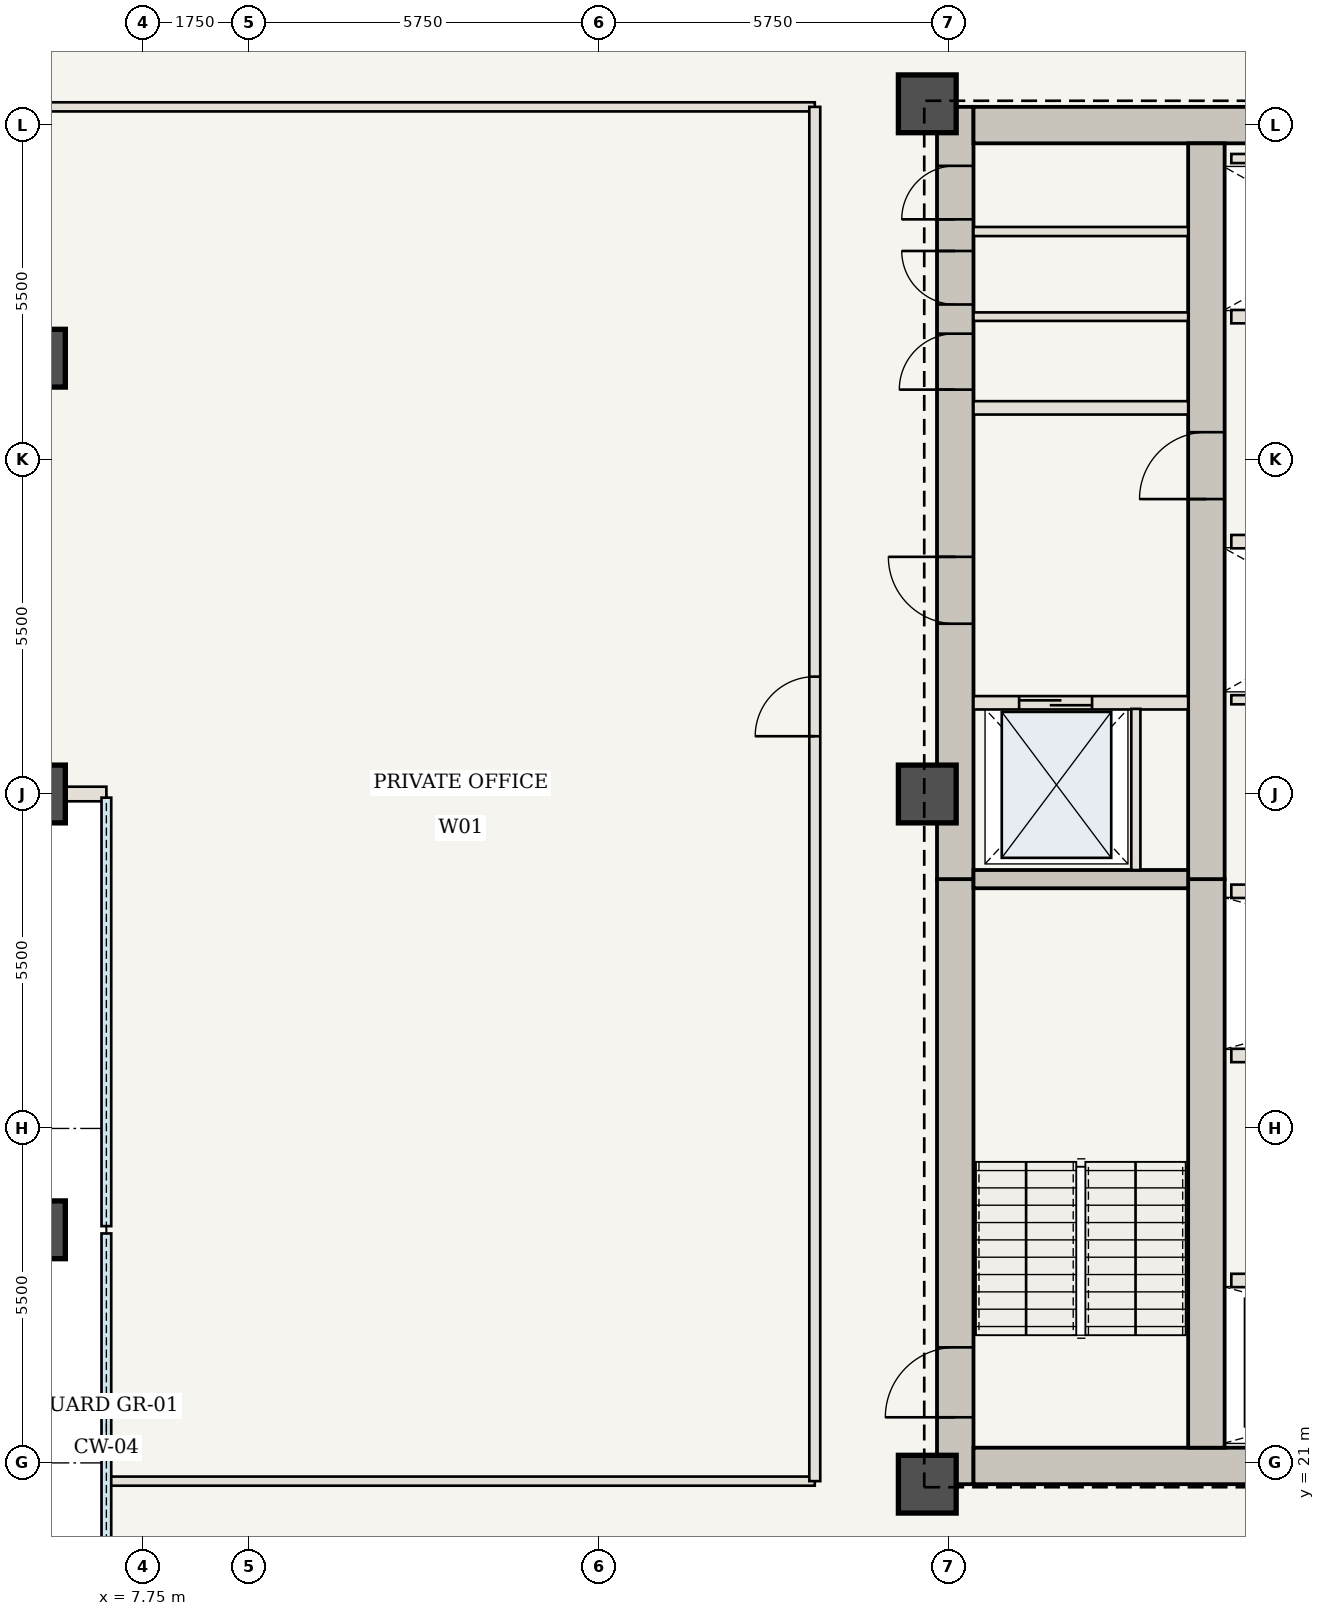
"""IFC4 building model, lengths in metres.
Left out: names, types, materials, properties, quantities, classifications, styles, units other than length and angle.
Written with IfcOpenShell. Run it as: python <this file> out.ifc"""

import sys

from ifc_helpers import new_model, si_unit, direction, frame, frame_2d, origin, origin_2d, place, context, subcontext, project, spatial, rectangle, extrude, element, fill, save


model = new_model("IFC4")
c1 = context("Model", 3, precision=1e-05, world=origin(), true_north=direction((0.0, 1.0)))
c2 = subcontext(c1, "Body", "Model", "MODEL_VIEW")
j1 = project(units=[si_unit("LENGTHUNIT", "METRE"), si_unit("PLANEANGLEUNIT", "RADIAN")], contexts=[c1])
p1 = place(None, origin())
s1 = spatial("IfcSite", under=j1, at=p1, CompositionType="ELEMENT")
p2 = place(p1, origin())
s2 = spatial("IfcBuilding", under=s1, at=p2, CompositionType="ELEMENT")
p3 = place(p2, frame((0.0, 0.0, 164.5)))
s3 = spatial("IfcBuildingStorey", under=s2, at=p3, CompositionType="ELEMENT", Elevation=164.5)
p4 = place(p3, frame((21.11, 20.65, 0.0), z_axis=(0.0, 0.0, 1.0), x_axis=(0.0, 1.0, 0.0)))
e1 = element("IfcWall", 1, at=p4, inside=s3, PredefinedType="SHEAR", context=c2, shape_type="SweptSolid", body=[
    extrude(rectangle(XDim=9.95, YDim=0.6, at=frame_2d((4.975, 0.0))), origin(), (0.0, 0.0, 1.0), 3.85),
])
p5 = place(p4, frame((1.1, 0.0, 0.0)))
e2 = element("IfcOpeningElement", 2, at=p5, cuts=e1, PredefinedType="OPENING", context=c2, shape_type="SweptSolid", body=[
    extrude(rectangle(XDim=1.15, YDim=2.15, at=frame_2d((0.575, 1.075))), frame((0.0, 0.31, 0.0), z_axis=(0.0, -1.0, 0.0), x_axis=(1.0, 0.0, 0.0)), (0.0, 0.0, 1.0), 0.62),
])
p6 = place(p3, frame((21.11, 30.6, 0.0), z_axis=(0.0, 0.0, 1.0), x_axis=(0.0, 1.0, 0.0)))
e3 = element("IfcWall", 3, at=p6, inside=s3, PredefinedType="SHEAR", context=c2, shape_type="SweptSolid", body=[
    extrude(rectangle(XDim=12.7, YDim=0.6, at=frame_2d((6.35, 0.0))), origin(), (0.0, 0.0, 1.0), 3.85),
])
p7 = place(p6, frame((4.2, 0.0, 0.0)))
e4 = element("IfcOpeningElement", 4, at=p7, cuts=e3, PredefinedType="OPENING", context=c2, shape_type="SweptSolid", body=[
    extrude(rectangle(XDim=1.1, YDim=2.15, at=frame_2d((0.55, 1.075))), frame((0.0, 0.31, 0.0), z_axis=(0.0, -1.0, 0.0), x_axis=(1.0, 0.0, 0.0)), (0.0, 0.0, 1.0), 0.62),
])
p8 = place(p6, frame((8.05, 0.0, 0.0)))
e5 = element("IfcOpeningElement", 5, at=p8, cuts=e3, PredefinedType="OPENING", context=c2, shape_type="SweptSolid", body=[
    extrude(rectangle(XDim=0.92, YDim=2.1, at=frame_2d((0.46, 1.05))), frame((0.0, 0.31, 0.0), z_axis=(0.0, -1.0, 0.0), x_axis=(1.0, 0.0, 0.0)), (0.0, 0.0, 1.0), 0.62),
])
p9 = place(p6, frame((9.45, 0.0, 0.0)))
e6 = element("IfcOpeningElement", 6, at=p9, cuts=e3, PredefinedType="OPENING", context=c2, shape_type="SweptSolid", body=[
    extrude(rectangle(XDim=0.88, YDim=2.1, at=frame_2d((0.44, 1.05))), frame((0.0, 0.31, 0.0), z_axis=(0.0, -1.0, 0.0), x_axis=(1.0, 0.0, 0.0)), (0.0, 0.0, 1.0), 0.62),
])
p10 = place(p6, frame((10.85, 0.0, 0.0)))
e7 = element("IfcOpeningElement", 7, at=p10, cuts=e3, PredefinedType="OPENING", context=c2, shape_type="SweptSolid", body=[
    extrude(rectangle(XDim=0.88, YDim=2.1, at=frame_2d((0.44, 1.05))), frame((0.0, 0.31, 0.0), z_axis=(0.0, -1.0, 0.0), x_axis=(1.0, 0.0, 0.0)), (0.0, 0.0, 1.0), 0.62),
])
p11 = place(p3, frame((21.41, 20.95, 0.0), z_axis=(0.0, 0.0, 1.0), x_axis=(1.0, 0.0, 0.0)))
e8 = element("IfcWall", 8, at=p11, inside=s3, PredefinedType="SHEAR", context=c2, shape_type="SweptSolid", body=[
    extrude(rectangle(XDim=13.74, YDim=0.6, at=frame_2d((6.87, 0.0))), origin(), (0.0, 0.0, 1.0), 3.85),
])
p12 = place(p3, frame((21.41, 43.0, 0.0), z_axis=(0.0, 0.0, 1.0), x_axis=(1.0, 0.0, 0.0)))
e9 = element("IfcWall", 9, at=p12, inside=s3, PredefinedType="SHEAR", context=c2, shape_type="SweptSolid", body=[
    extrude(rectangle(XDim=8.24, YDim=0.6, at=frame_2d((4.12, 0.0))), origin(), (0.0, 0.0, 1.0), 3.85),
])
p13 = place(p3, frame((25.24, 21.25, 0.0), z_axis=(0.0, 0.0, 1.0), x_axis=(0.0, 1.0, 0.0)))
e10 = element("IfcWall", 10, at=p13, inside=s3, PredefinedType="SHEAR", context=c2, shape_type="SweptSolid", body=[
    extrude(rectangle(XDim=9.35, YDim=0.6, at=frame_2d((4.675, 0.0))), origin(), (0.0, 0.0, 1.0), 3.85),
])
p14 = place(p3, frame((25.24, 30.6, 0.0), z_axis=(0.0, 0.0, 1.0), x_axis=(0.0, 1.0, 0.0)))
e11 = element("IfcWall", 11, at=p14, inside=s3, PredefinedType="SHEAR", context=c2, shape_type="SweptSolid", body=[
    extrude(rectangle(XDim=12.1, YDim=0.6, at=frame_2d((6.05, 0.0))), origin(), (0.0, 0.0, 1.0), 3.85),
])
p15 = place(p14, frame((6.25, 0.0, 0.0)))
e12 = element("IfcOpeningElement", 12, at=p15, cuts=e11, PredefinedType="OPENING", context=c2, shape_type="SweptSolid", body=[
    extrude(rectangle(XDim=1.1, YDim=2.15, at=frame_2d((0.55, 1.075))), frame((0.0, 0.31, 0.0), z_axis=(0.0, -1.0, 0.0), x_axis=(1.0, 0.0, 0.0)), (0.0, 0.0, 1.0), 0.62),
])
for number, where, z_axis, x_axis in (
    (13, (20.65, 20.65, 0.0), (0.0, 0.0, 1.0), (1.0, 0.0, 0.0)),
    (14, (20.65, 43.35, 0.0), (0.0, 0.0, 1.0), (1.0, 0.0, 0.0)),
    (15, (20.65, 32.0, 0.0), (0.0, 0.0, 1.0), (1.0, 0.0, 0.0)),
    (16, (6.0, 24.833, 0.0), (0.0, 0.0, 1.0), (1.0, 0.0, 0.0)),
    (17, (6.0, 32.0, 0.0), (0.0, 0.0, 1.0), (1.0, 0.0, 0.0)),
    (18, (6.0, 39.167, 0.0), (0.0, 0.0, 1.0), (1.0, 0.0, 0.0)),
):
    element("IfcColumn", number, at=place(p3, frame(where, z_axis=z_axis, x_axis=x_axis)), inside=s3, PredefinedType="COLUMN", context=c2, shape_type="SweptSolid", body=[
        extrude(rectangle(XDim=0.95, YDim=0.95, at=origin_2d()), origin(), (0.0, 0.0, 1.0), 3.85),
    ])
p16 = place(p3, frame((21.41, 30.6, 0.0), z_axis=(0.0, 0.0, 1.0), x_axis=(1.0, 0.0, 0.0)))
e19 = element("IfcWall", 19, at=p16, inside=s3, PredefinedType="SHEAR", context=c2, shape_type="SweptSolid", body=[
    extrude(rectangle(XDim=3.53, YDim=0.3, at=frame_2d((1.765, 0.0))), origin(), (0.0, 0.0, 1.0), 3.685),
])
p17 = place(p3, frame((21.41, 33.5, 0.0), z_axis=(0.0, 0.0, 1.0), x_axis=(1.0, 0.0, 0.0)))
e20 = element("IfcWall", 20, at=p17, inside=s3, PredefinedType="STANDARD", context=c2, shape_type="SweptSolid", body=[
    extrude(rectangle(XDim=3.53, YDim=0.22, at=frame_2d((1.765, 0.0))), origin(), (0.0, 0.0, 1.0), 3.685),
])
p18 = place(p17, frame((0.75, 0.0, 0.0)))
e21 = element("IfcOpeningElement", 21, at=p18, cuts=e20, PredefinedType="OPENING", context=c2, shape_type="SweptSolid", body=[
    extrude(rectangle(XDim=1.2, YDim=2.2, at=frame_2d((0.6, 1.1))), frame((0.0, 0.12, 0.0), z_axis=(0.0, -1.0, 0.0), x_axis=(1.0, 0.0, 0.0)), (0.0, 0.0, 1.0), 0.24),
])
p19 = place(p3, frame((24.08, 30.75, 0.0), z_axis=(0.0, 0.0, 1.0), x_axis=(0.0, 1.0, 0.0)))
e22 = element("IfcWall", 22, at=p19, inside=s3, PredefinedType="STANDARD", context=c2, shape_type="SweptSolid", body=[
    extrude(rectangle(XDim=2.65, YDim=0.15, at=frame_2d((1.325, 0.0))), origin(), (0.0, 0.0, 1.0), 3.685),
])
p20 = place(p3, frame((21.41, 38.35, 0.0), z_axis=(0.0, 0.0, 1.0), x_axis=(1.0, 0.0, 0.0)))
e23 = element("IfcWall", 23, at=p20, inside=s3, PredefinedType="STANDARD", context=c2, shape_type="SweptSolid", body=[
    extrude(rectangle(XDim=3.53, YDim=0.22, at=frame_2d((1.765, 0.0))), origin(), (0.0, 0.0, 1.0), 3.685),
])
p21 = place(p3, frame((21.41, 39.85, 0.0), z_axis=(0.0, 0.0, 1.0), x_axis=(1.0, 0.0, 0.0)))
e24 = element("IfcWall", 24, at=p21, inside=s3, PredefinedType="STANDARD", context=c2, shape_type="SweptSolid", body=[
    extrude(rectangle(XDim=3.53, YDim=0.14, at=frame_2d((1.765, 0.0))), origin(), (0.0, 0.0, 1.0), 3.685),
])
p22 = place(p3, frame((21.41, 41.25, 0.0), z_axis=(0.0, 0.0, 1.0), x_axis=(1.0, 0.0, 0.0)))
e25 = element("IfcWall", 25, at=p22, inside=s3, PredefinedType="STANDARD", context=c2, shape_type="SweptSolid", body=[
    extrude(rectangle(XDim=3.53, YDim=0.15, at=frame_2d((1.765, 0.0))), origin(), (0.0, 0.0, 1.0), 3.685),
])
p23 = place(p3, frame((25.65, 24.0, 0.0), z_axis=(0.0, 0.0, 1.0), x_axis=(1.0, 0.0, 0.0)))
e26 = element("IfcWall", 26, at=p23, inside=s3, PredefinedType="STANDARD", context=c2, shape_type="SweptSolid", body=[
    extrude(rectangle(XDim=9.25, YDim=0.22, at=frame_2d((4.625, 0.0))), origin(), (0.0, 0.0, 1.0), 3.685),
])
p24 = place(p23, frame((0.58, 0.0, 0.0)))
e27 = element("IfcOpeningElement", 27, at=p24, cuts=e26, PredefinedType="OPENING", context=c2, shape_type="SweptSolid", body=[
    extrude(rectangle(XDim=1.1, YDim=2.15, at=frame_2d((0.55, 1.075))), frame((0.0, 0.12, 0.0), z_axis=(0.0, -1.0, 0.0), x_axis=(1.0, 0.0, 0.0)), (0.0, 0.0, 1.0), 0.24),
])
p25 = place(p23, frame((2.75, 0.0, 0.0)))
e28 = element("IfcOpeningElement", 28, at=p25, cuts=e26, PredefinedType="OPENING", context=c2, shape_type="SweptSolid", body=[
    extrude(rectangle(XDim=1.1, YDim=2.15, at=frame_2d((0.55, 1.075))), frame((0.0, 0.12, 0.0), z_axis=(0.0, -1.0, 0.0), x_axis=(1.0, 0.0, 0.0)), (0.0, 0.0, 1.0), 0.24),
])
p26 = place(p23, frame((5.05, 0.0, 0.0)))
e29 = element("IfcOpeningElement", 29, at=p26, cuts=e26, PredefinedType="OPENING", context=c2, shape_type="SweptSolid", body=[
    extrude(rectangle(XDim=1.1, YDim=2.15, at=frame_2d((0.55, 1.075))), frame((0.0, 0.12, 0.0), z_axis=(0.0, -1.0, 0.0), x_axis=(1.0, 0.0, 0.0)), (0.0, 0.0, 1.0), 0.24),
])
p27 = place(p23, frame((7.35, 0.0, 0.0)))
e30 = element("IfcOpeningElement", 30, at=p27, cuts=e26, PredefinedType="OPENING", context=c2, shape_type="SweptSolid", body=[
    extrude(rectangle(XDim=1.1, YDim=2.15, at=frame_2d((0.55, 1.075))), frame((0.0, 0.12, 0.0), z_axis=(0.0, -1.0, 0.0), x_axis=(1.0, 0.0, 0.0)), (0.0, 0.0, 1.0), 0.24),
])
for number, where, z_axis, x_axis in (
    (31, (25.65, 27.7, 0.0), (0.0, 0.0, 1.0), (1.0, 0.0, 0.0)),
    (32, (25.65, 30.4, 0.0), (0.0, 0.0, 1.0), (1.0, 0.0, 0.0)),
):
    element("IfcWall", number, at=place(p3, frame(where, z_axis=z_axis, x_axis=x_axis)), inside=s3, PredefinedType="STANDARD", context=c2, shape_type="SweptSolid", body=[
        extrude(rectangle(XDim=9.25, YDim=0.22, at=frame_2d((4.625, 0.0))), origin(), (0.0, 0.0, 1.0), 3.685),
    ])
p28 = place(p3, frame((25.65, 36.15, 0.0), z_axis=(0.0, 0.0, 1.0), x_axis=(1.0, 0.0, 0.0)))
e33 = element("IfcWall", 33, at=p28, inside=s3, PredefinedType="STANDARD", context=c2, shape_type="SweptSolid", body=[
    extrude(rectangle(XDim=4.3, YDim=0.22, at=frame_2d((2.15, 0.0))), origin(), (0.0, 0.0, 1.0), 3.685),
])
p29 = place(p3, frame((25.65, 33.55, 0.0), z_axis=(0.0, 0.0, 1.0), x_axis=(1.0, 0.0, 0.0)))
e34 = element("IfcWall", 34, at=p29, inside=s3, PredefinedType="STANDARD", context=c2, shape_type="SweptSolid", body=[
    extrude(rectangle(XDim=4.2, YDim=0.15, at=frame_2d((2.1, 0.0))), origin(), (0.0, 0.0, 1.0), 3.685),
])
p30 = place(p3, frame((25.65, 39.85, 0.0), z_axis=(0.0, 0.0, 1.0), x_axis=(1.0, 0.0, 0.0)))
e35 = element("IfcWall", 35, at=p30, inside=s3, PredefinedType="STANDARD", context=c2, shape_type="SweptSolid", body=[
    extrude(rectangle(XDim=4.3, YDim=0.22, at=frame_2d((2.15, 0.0))), origin(), (0.0, 0.0, 1.0), 3.685),
])
p31 = place(p3, frame((25.65, 42.45, 0.0), z_axis=(0.0, 0.0, 1.0), x_axis=(1.0, 0.0, 0.0)))
e36 = element("IfcWall", 36, at=p31, inside=s3, PredefinedType="STANDARD", context=c2, shape_type="SweptSolid", body=[
    extrude(rectangle(XDim=4.2, YDim=0.15, at=frame_2d((2.1, 0.0))), origin(), (0.0, 0.0, 1.0), 3.685),
])
p32 = place(p3, frame((7.16, 20.7, 0.0), z_axis=(0.0, 0.0, 1.0), x_axis=(1.0, 0.0, 0.0)))
e37 = element("IfcWall", 37, at=p32, inside=s3, PredefinedType="STANDARD", context=c2, shape_type="SweptSolid", body=[
    extrude(rectangle(XDim=11.64, YDim=0.15, at=frame_2d((5.82, 0.0))), origin(), (0.0, 0.0, 1.0), 3.056),
])
p33 = place(p3, frame((6.06, 43.3, 0.0), z_axis=(0.0, 0.0, 1.0), x_axis=(1.0, 0.0, 0.0)))
e38 = element("IfcWall", 38, at=p33, inside=s3, PredefinedType="STANDARD", context=c2, shape_type="SweptSolid", body=[
    extrude(rectangle(XDim=12.74, YDim=0.15, at=frame_2d((6.37, 0.0))), origin(), (0.0, 0.0, 1.0), 3.056),
])
p34 = place(p3, frame((18.8, 20.7, 0.0), z_axis=(0.0, 0.0, 1.0), x_axis=(0.0, 1.0, 0.0)))
e39 = element("IfcWall", 39, at=p34, inside=s3, PredefinedType="STANDARD", context=c2, shape_type="SweptSolid", body=[
    extrude(rectangle(XDim=22.6, YDim=0.18, at=frame_2d((11.3, 0.0))), origin(), (0.0, 0.0, 1.0), 3.685),
])
p35 = place(p34, frame((12.25, 0.0, 0.0)))
e40 = element("IfcOpeningElement", 40, at=p35, cuts=e39, PredefinedType="OPENING", context=c2, shape_type="SweptSolid", body=[
    extrude(rectangle(XDim=0.98, YDim=2.2, at=frame_2d((0.49, 1.1))), frame((0.0, 0.1, 0.0), z_axis=(0.0, -1.0, 0.0), x_axis=(1.0, 0.0, 0.0)), (0.0, 0.0, 1.0), 0.2),
])
p36 = place(p3, frame((6.0, 32.0, 0.0), z_axis=(0.0, 0.0, 1.0), x_axis=(1.0, 0.0, 0.0)))
e41 = element("IfcWall", 41, at=p36, inside=s3, PredefinedType="USERDEFINED", context=c2, shape_type="SweptSolid", body=[
    extrude(rectangle(XDim=1.15, YDim=0.24, at=frame_2d((0.575, 0.0))), origin(), (0.0, 0.0, 1.0), 2.885),
])
p37 = place(p5, origin())
e42 = element("IfcDoor", 42, at=p37, inside=s3, OperationType="SINGLE_SWING_LEFT", PredefinedType="DOOR", context=c2, shape_type="SweptSolid", body=[
    extrude(rectangle(XDim=1.15, YDim=2.15, at=frame_2d((0.575, 1.075))), frame((0.0, 0.025, 0.0), z_axis=(0.0, -1.0, 0.0), x_axis=(1.0, 0.0, 0.0)), (0.0, 0.0, 1.0), 0.05),
])
fill(e2, e42)
p38 = place(p7, origin())
e43 = element("IfcDoor", 43, at=p38, inside=s3, OperationType="SINGLE_SWING_RIGHT", PredefinedType="DOOR", context=c2, shape_type="SweptSolid", body=[
    extrude(rectangle(XDim=1.1, YDim=2.15, at=frame_2d((0.55, 1.075))), frame((0.0, 0.025, 0.0), z_axis=(0.0, -1.0, 0.0), x_axis=(1.0, 0.0, 0.0)), (0.0, 0.0, 1.0), 0.05),
])
fill(e4, e43)
p39 = place(p15, origin())
e44 = element("IfcDoor", 44, at=p39, inside=s3, OperationType="SINGLE_SWING_LEFT", PredefinedType="DOOR", context=c2, shape_type="SweptSolid", body=[
    extrude(rectangle(XDim=1.1, YDim=2.15, at=frame_2d((0.55, 1.075))), frame((0.0, 0.025, 0.0), z_axis=(0.0, -1.0, 0.0), x_axis=(1.0, 0.0, 0.0)), (0.0, 0.0, 1.0), 0.05),
])
fill(e12, e44)
p40 = place(p8, origin())
e45 = element("IfcDoor", 45, at=p40, inside=s3, OperationType="SINGLE_SWING_LEFT", PredefinedType="DOOR", context=c2, shape_type="SweptSolid", body=[
    extrude(rectangle(XDim=0.92, YDim=2.1, at=frame_2d((0.46, 1.05))), frame((0.0, 0.025, 0.0), z_axis=(0.0, -1.0, 0.0), x_axis=(1.0, 0.0, 0.0)), (0.0, 0.0, 1.0), 0.05),
])
fill(e5, e45)
p41 = place(p9, origin())
e46 = element("IfcDoor", 46, at=p41, inside=s3, OperationType="SINGLE_SWING_RIGHT", PredefinedType="DOOR", context=c2, shape_type="SweptSolid", body=[
    extrude(rectangle(XDim=0.88, YDim=2.1, at=frame_2d((0.44, 1.05))), frame((0.0, 0.025, 0.0), z_axis=(0.0, -1.0, 0.0), x_axis=(1.0, 0.0, 0.0)), (0.0, 0.0, 1.0), 0.05),
])
fill(e6, e46)
p42 = place(p10, origin())
e47 = element("IfcDoor", 47, at=p42, inside=s3, OperationType="SINGLE_SWING_LEFT", PredefinedType="DOOR", context=c2, shape_type="SweptSolid", body=[
    extrude(rectangle(XDim=0.88, YDim=2.1, at=frame_2d((0.44, 1.05))), frame((0.0, 0.025, 0.0), z_axis=(0.0, -1.0, 0.0), x_axis=(1.0, 0.0, 0.0)), (0.0, 0.0, 1.0), 0.05),
])
fill(e7, e47)
p43 = place(p18, origin())
e48 = element("IfcDoor", 48, at=p43, inside=s3, OperationType="DOUBLE_DOOR_SLIDING", PredefinedType="DOOR", context=c2, shape_type="SweptSolid", body=[
    extrude(rectangle(XDim=1.2, YDim=2.2, at=frame_2d((0.6, 1.1))), frame((0.0, 0.025, 0.0), z_axis=(0.0, -1.0, 0.0), x_axis=(1.0, 0.0, 0.0)), (0.0, 0.0, 1.0), 0.05),
])
fill(e21, e48)
p44 = place(p35, origin())
e49 = element("IfcDoor", 49, at=p44, inside=s3, OperationType="SINGLE_SWING_LEFT", PredefinedType="DOOR", context=c2, shape_type="SweptSolid", body=[
    extrude(rectangle(XDim=0.98, YDim=2.2, at=frame_2d((0.49, 1.1))), frame((0.0, 0.025, 0.0), z_axis=(0.0, -1.0, 0.0), x_axis=(1.0, 0.0, 0.0)), (0.0, 0.0, 1.0), 0.05),
])
fill(e40, e49)
save(model, sys.argv[1])
